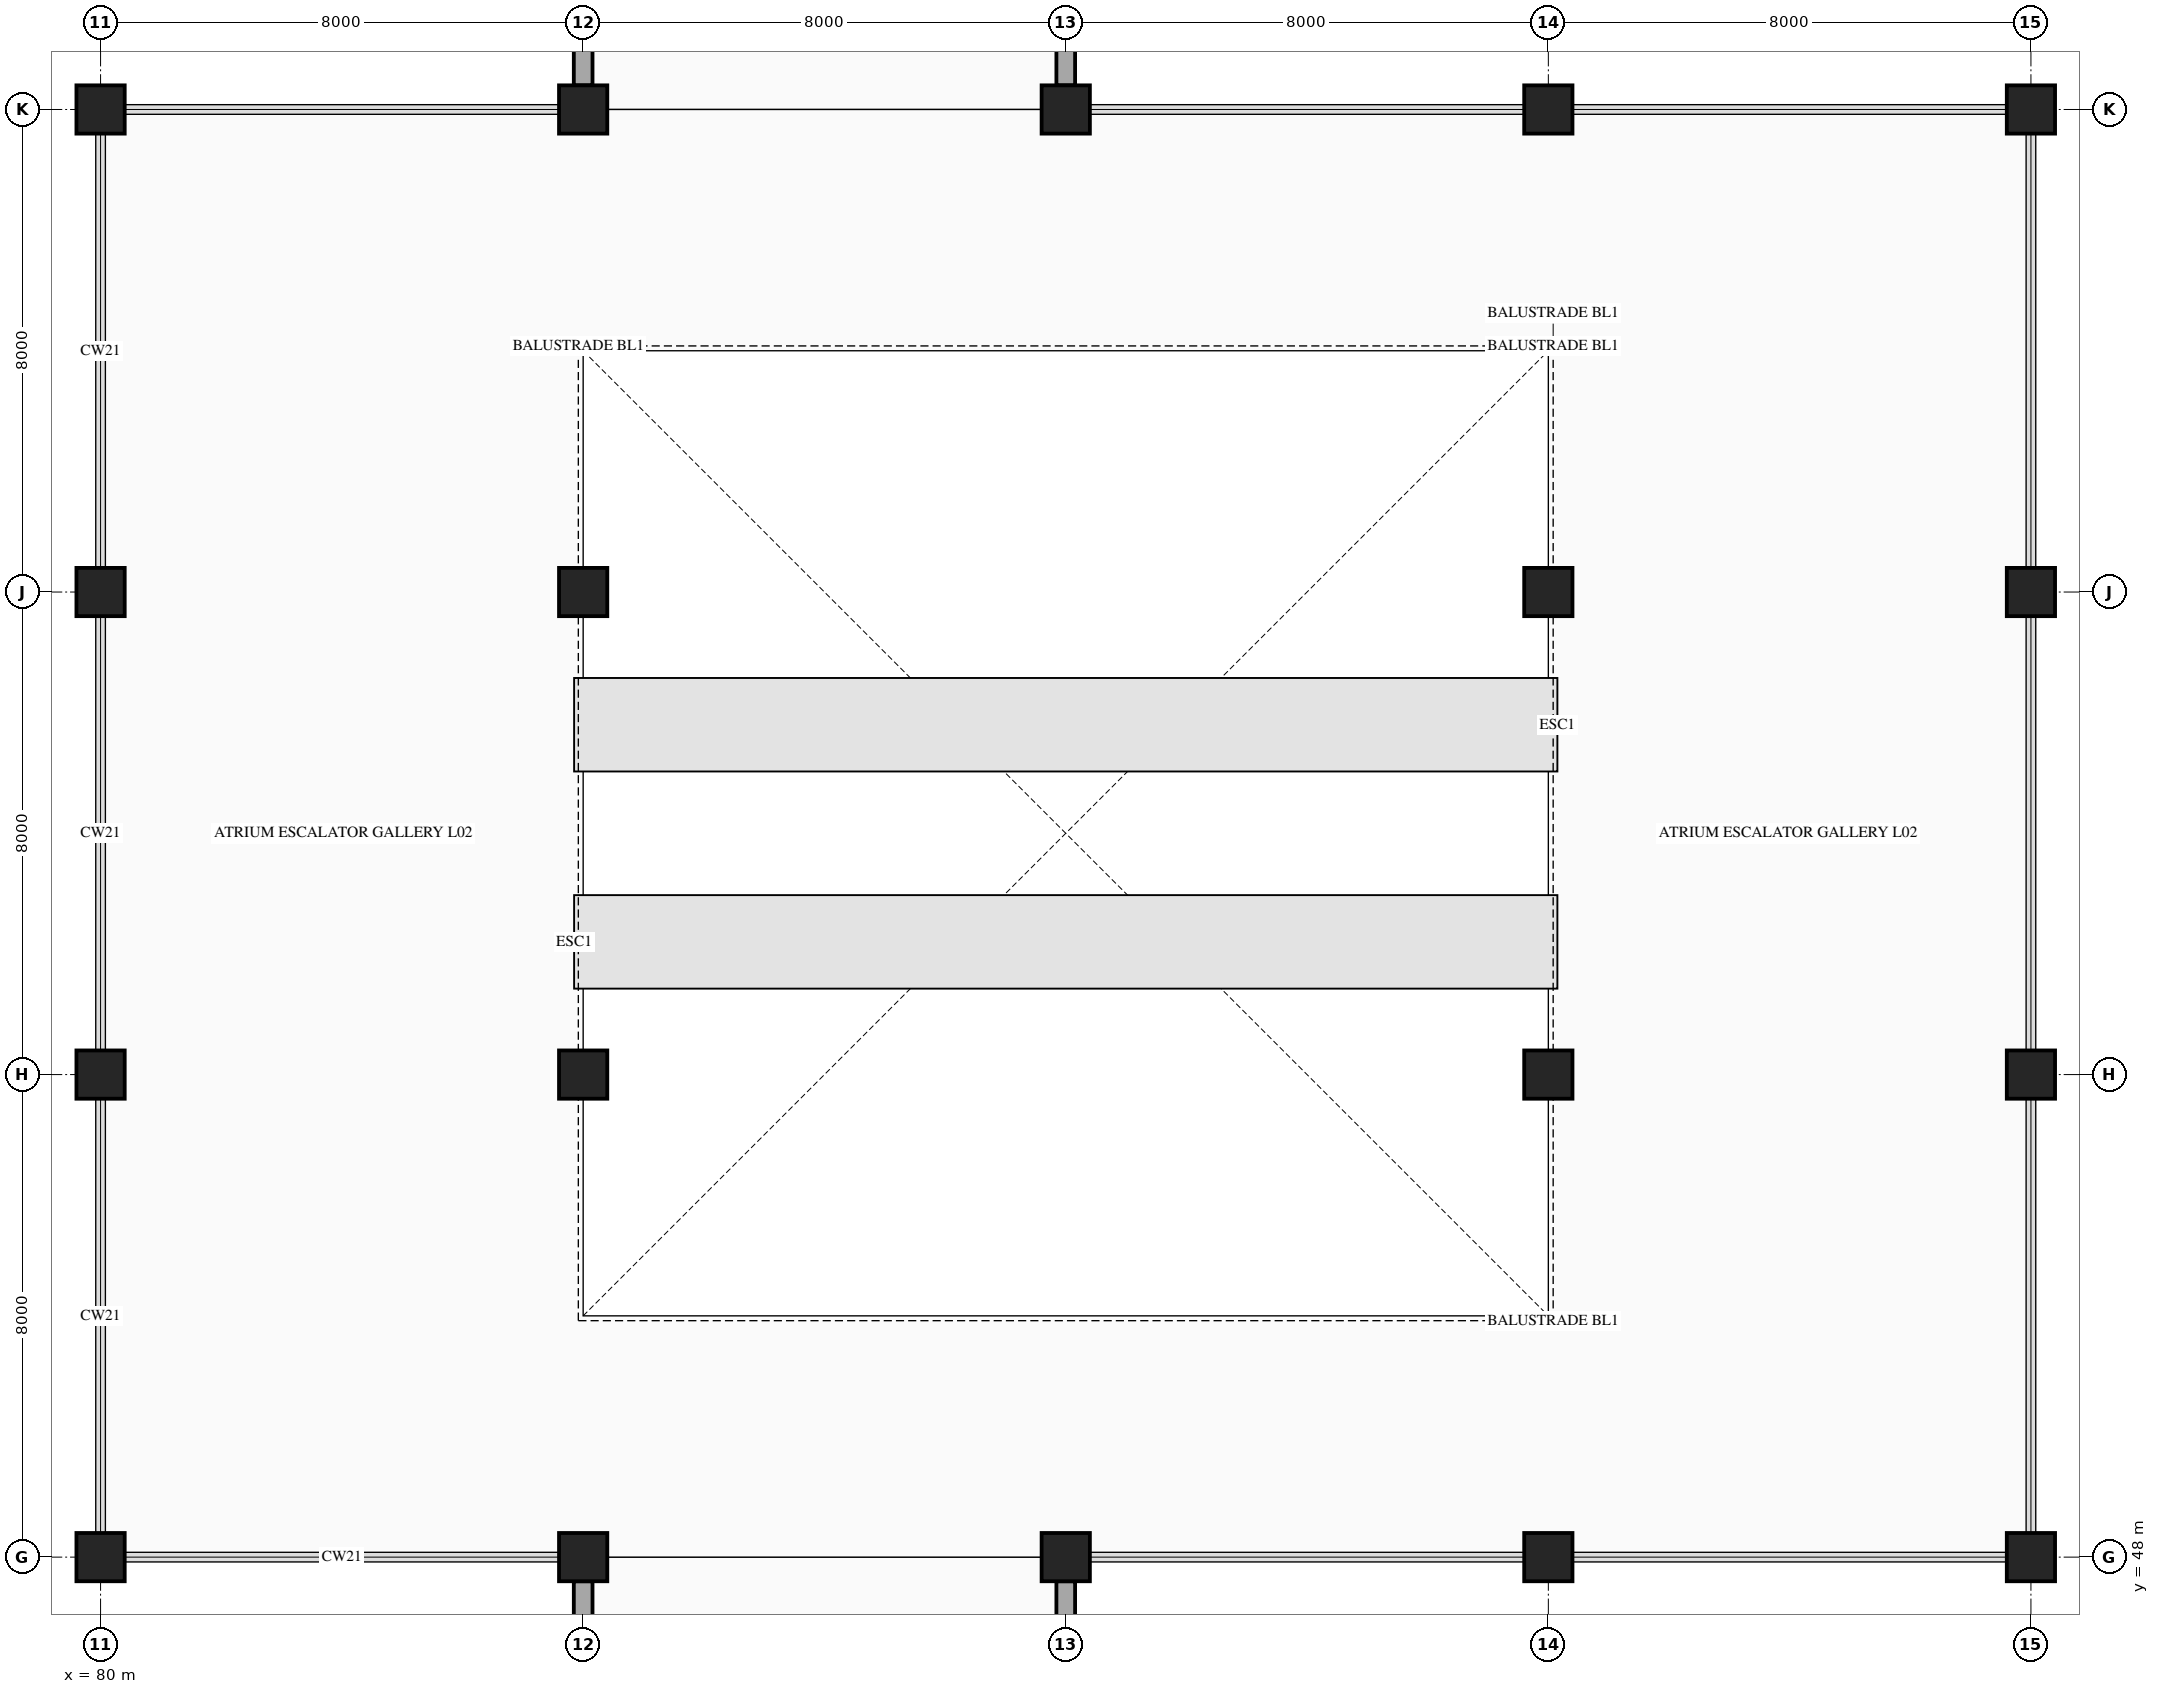
"""IFC4 building model, lengths in metres.
Left out: names, types, materials, properties, quantities, classifications, styles, units other than length and angle.
Written with IfcOpenShell. Run it as: python <this file> out.ifc"""

import sys

from ifc_helpers import new_model, si_unit, direction, frame, frame_2d, origin, origin_2d, place, context, subcontext, project, spatial, rectangle, circle, extrude, element, save


model = new_model("IFC4")
c1 = context("Model", 3, precision=1e-05, world=origin(), true_north=direction((0.0, 1.0)))
c2 = subcontext(c1, "Body", "Model", "MODEL_VIEW")
j1 = project(units=[si_unit("LENGTHUNIT", "METRE"), si_unit("PLANEANGLEUNIT", "RADIAN")], contexts=[c1])
p1 = place(None, origin())
s1 = spatial("IfcSite", under=j1, at=p1, CompositionType="ELEMENT")
p2 = place(p1, origin())
s2 = spatial("IfcBuilding", under=s1, at=p2, CompositionType="ELEMENT")
p3 = place(p2, frame((0.0, 0.0, 10.4)))
s3 = spatial("IfcBuildingStorey", under=s2, at=p3, CompositionType="ELEMENT", Elevation=10.4)
p4 = place(p3, frame((80.0, 48.0, 0.0), z_axis=(0.0, 0.0, 1.0), x_axis=(1.0, 0.0, 0.0)))
e1 = element("IfcColumn", 1, at=p4, inside=s3, PredefinedType="COLUMN", context=c2, shape_type="SweptSolid", body=[
    extrude(circle(Radius=0.4, at=origin_2d()), origin(), (0.0, 0.0, 1.0), 4.5),
])
p5 = place(p3, frame((80.0, 56.0, 0.0), z_axis=(0.0, 0.0, 1.0), x_axis=(1.0, 0.0, 0.0)))
e2 = element("IfcColumn", 2, at=p5, inside=s3, PredefinedType="COLUMN", context=c2, shape_type="SweptSolid", body=[
    extrude(rectangle(XDim=0.8, YDim=0.8, at=origin_2d()), origin(), (0.0, 0.0, 1.0), 4.5),
])
p6 = place(p3, frame((80.0, 64.0, 0.0), z_axis=(0.0, 0.0, 1.0), x_axis=(1.0, 0.0, 0.0)))
e3 = element("IfcColumn", 3, at=p6, inside=s3, PredefinedType="COLUMN", context=c2, shape_type="SweptSolid", body=[
    extrude(circle(Radius=0.4, at=origin_2d()), origin(), (0.0, 0.0, 1.0), 4.5),
])
for number, where, z_axis, x_axis in (
    (4, (80.0, 72.0, 0.0), (0.0, 0.0, 1.0), (1.0, 0.0, 0.0)),
    (5, (88.0, 48.0, 0.0), (0.0, 0.0, 1.0), (1.0, 0.0, 0.0)),
):
    element("IfcColumn", number, at=place(p3, frame(where, z_axis=z_axis, x_axis=x_axis)), inside=s3, PredefinedType="COLUMN", context=c2, shape_type="SweptSolid", body=[
        extrude(rectangle(XDim=0.8, YDim=0.8, at=origin_2d()), origin(), (0.0, 0.0, 1.0), 4.5),
    ])
p7 = place(p3, frame((88.0, 56.0, 0.0), z_axis=(0.0, 0.0, 1.0), x_axis=(1.0, 0.0, 0.0)))
e6 = element("IfcColumn", 6, at=p7, inside=s3, PredefinedType="COLUMN", context=c2, shape_type="SweptSolid", body=[
    extrude(circle(Radius=0.4, at=origin_2d()), origin(), (0.0, 0.0, 1.0), 4.5),
])
p8 = place(p3, frame((88.0, 64.0, 0.0), z_axis=(0.0, 0.0, 1.0), x_axis=(1.0, 0.0, 0.0)))
e7 = element("IfcColumn", 7, at=p8, inside=s3, PredefinedType="COLUMN", context=c2, shape_type="SweptSolid", body=[
    extrude(rectangle(XDim=0.8, YDim=0.8, at=origin_2d()), origin(), (0.0, 0.0, 1.0), 4.5),
])
for number, where, z_axis, x_axis in (
    (8, (88.0, 72.0, 0.0), (0.0, 0.0, 1.0), (1.0, 0.0, 0.0)),
    (9, (96.0, 48.0, 0.0), (0.0, 0.0, 1.0), (1.0, 0.0, 0.0)),
):
    element("IfcColumn", number, at=place(p3, frame(where, z_axis=z_axis, x_axis=x_axis)), inside=s3, PredefinedType="COLUMN", context=c2, shape_type="SweptSolid", body=[
        extrude(circle(Radius=0.4, at=origin_2d()), origin(), (0.0, 0.0, 1.0), 4.5),
    ])
for number, where, z_axis, x_axis in (
    (10, (96.0, 72.0, 0.0), (0.0, 0.0, 1.0), (1.0, 0.0, 0.0)),
    (11, (104.0, 48.0, 0.0), (0.0, 0.0, 1.0), (1.0, 0.0, 0.0)),
):
    element("IfcColumn", number, at=place(p3, frame(where, z_axis=z_axis, x_axis=x_axis)), inside=s3, PredefinedType="COLUMN", context=c2, shape_type="SweptSolid", body=[
        extrude(rectangle(XDim=0.8, YDim=0.8, at=origin_2d()), origin(), (0.0, 0.0, 1.0), 4.5),
    ])
p9 = place(p3, frame((104.0, 56.0, 0.0), z_axis=(0.0, 0.0, 1.0), x_axis=(1.0, 0.0, 0.0)))
e12 = element("IfcColumn", 12, at=p9, inside=s3, PredefinedType="COLUMN", context=c2, shape_type="SweptSolid", body=[
    extrude(circle(Radius=0.4, at=origin_2d()), origin(), (0.0, 0.0, 1.0), 4.5),
])
p10 = place(p3, frame((104.0, 64.0, 0.0), z_axis=(0.0, 0.0, 1.0), x_axis=(1.0, 0.0, 0.0)))
e13 = element("IfcColumn", 13, at=p10, inside=s3, PredefinedType="COLUMN", context=c2, shape_type="SweptSolid", body=[
    extrude(rectangle(XDim=0.8, YDim=0.8, at=origin_2d()), origin(), (0.0, 0.0, 1.0), 4.5),
])
for number, where, z_axis, x_axis in (
    (14, (104.0, 72.0, 0.0), (0.0, 0.0, 1.0), (1.0, 0.0, 0.0)),
    (15, (112.0, 48.0, 0.0), (0.0, 0.0, 1.0), (1.0, 0.0, 0.0)),
):
    element("IfcColumn", number, at=place(p3, frame(where, z_axis=z_axis, x_axis=x_axis)), inside=s3, PredefinedType="COLUMN", context=c2, shape_type="SweptSolid", body=[
        extrude(circle(Radius=0.4, at=origin_2d()), origin(), (0.0, 0.0, 1.0), 4.5),
    ])
p11 = place(p3, frame((112.0, 56.0, 0.0), z_axis=(0.0, 0.0, 1.0), x_axis=(1.0, 0.0, 0.0)))
e16 = element("IfcColumn", 16, at=p11, inside=s3, PredefinedType="COLUMN", context=c2, shape_type="SweptSolid", body=[
    extrude(rectangle(XDim=0.8, YDim=0.8, at=origin_2d()), origin(), (0.0, 0.0, 1.0), 4.5),
])
p12 = place(p3, frame((112.0, 64.0, 0.0), z_axis=(0.0, 0.0, 1.0), x_axis=(1.0, 0.0, 0.0)))
e17 = element("IfcColumn", 17, at=p12, inside=s3, PredefinedType="COLUMN", context=c2, shape_type="SweptSolid", body=[
    extrude(circle(Radius=0.4, at=origin_2d()), origin(), (0.0, 0.0, 1.0), 4.5),
])
p13 = place(p3, frame((112.0, 72.0, 0.0), z_axis=(0.0, 0.0, 1.0), x_axis=(1.0, 0.0, 0.0)))
e18 = element("IfcColumn", 18, at=p13, inside=s3, PredefinedType="COLUMN", context=c2, shape_type="SweptSolid", body=[
    extrude(rectangle(XDim=0.8, YDim=0.8, at=origin_2d()), origin(), (0.0, 0.0, 1.0), 4.5),
])
p14 = place(p3, frame((88.0, 40.375, 0.0), z_axis=(0.0, 0.0, 1.0), x_axis=(0.0, 1.0, 0.0)))
e19 = element("IfcWall", 19, at=p14, inside=s3, PredefinedType="STANDARD", context=c2, shape_type="SweptSolid", body=[
    extrude(rectangle(XDim=7.225, YDim=0.31, at=frame_2d((3.613, 0.0))), origin(), (0.0, 0.0, 1.0), 3.48),
])
p15 = place(p14, frame((2.438, 0.0, 0.8)))
e20 = element("IfcOpeningElement", 20, at=p15, cuts=e19, PredefinedType="OPENING", context=c2, shape_type="SweptSolid", body=[
    extrude(rectangle(XDim=2.35, YDim=2.15, at=frame_2d((1.175, 1.075))), frame((0.0, 0.165, 0.0), z_axis=(0.0, -1.0, 0.0), x_axis=(1.0, 0.0, 0.0)), (0.0, 0.0, 1.0), 0.33),
])
p16 = place(p3, frame((88.0, 72.4, 0.0), z_axis=(0.0, 0.0, 1.0), x_axis=(0.0, 1.0, 0.0)))
e21 = element("IfcWall", 21, at=p16, inside=s3, PredefinedType="STANDARD", context=c2, shape_type="SweptSolid", body=[
    extrude(rectangle(XDim=7.275, YDim=0.31, at=frame_2d((3.638, 0.0))), origin(), (0.0, 0.0, 1.0), 3.48),
])
p17 = place(p16, frame((2.462, 0.0, 0.8)))
e22 = element("IfcOpeningElement", 22, at=p17, cuts=e21, PredefinedType="OPENING", context=c2, shape_type="SweptSolid", body=[
    extrude(rectangle(XDim=2.35, YDim=2.15, at=frame_2d((1.175, 1.075))), frame((0.0, 0.165, 0.0), z_axis=(0.0, -1.0, 0.0), x_axis=(1.0, 0.0, 0.0)), (0.0, 0.0, 1.0), 0.33),
])
p18 = place(p3, frame((96.0, 79.675, 0.0), z_axis=(0.0, 0.0, 1.0), x_axis=(0.0, -1.0, 0.0)))
e23 = element("IfcWall", 23, at=p18, inside=s3, PredefinedType="STANDARD", context=c2, shape_type="SweptSolid", body=[
    extrude(rectangle(XDim=7.275, YDim=0.31, at=frame_2d((3.638, 0.0))), origin(), (0.0, 0.0, 1.0), 3.48),
])
p19 = place(p18, frame((2.462, 0.0, 0.8)))
e24 = element("IfcOpeningElement", 24, at=p19, cuts=e23, PredefinedType="OPENING", context=c2, shape_type="SweptSolid", body=[
    extrude(rectangle(XDim=2.35, YDim=2.15, at=frame_2d((1.175, 1.075))), frame((0.0, 0.165, 0.0), z_axis=(0.0, -1.0, 0.0), x_axis=(1.0, 0.0, 0.0)), (0.0, 0.0, 1.0), 0.33),
])
p20 = place(p3, frame((96.0, 47.6, 0.0), z_axis=(0.0, 0.0, 1.0), x_axis=(0.0, -1.0, 0.0)))
e25 = element("IfcWall", 25, at=p20, inside=s3, PredefinedType="STANDARD", context=c2, shape_type="SweptSolid", body=[
    extrude(rectangle(XDim=7.225, YDim=0.31, at=frame_2d((3.613, 0.0))), origin(), (0.0, 0.0, 1.0), 3.48),
])
p21 = place(p20, frame((2.438, 0.0, 0.8)))
e26 = element("IfcOpeningElement", 26, at=p21, cuts=e25, PredefinedType="OPENING", context=c2, shape_type="SweptSolid", body=[
    extrude(rectangle(XDim=2.35, YDim=2.15, at=frame_2d((1.175, 1.075))), frame((0.0, 0.165, 0.0), z_axis=(0.0, -1.0, 0.0), x_axis=(1.0, 0.0, 0.0)), (0.0, 0.0, 1.0), 0.33),
])
save(model, sys.argv[1])
